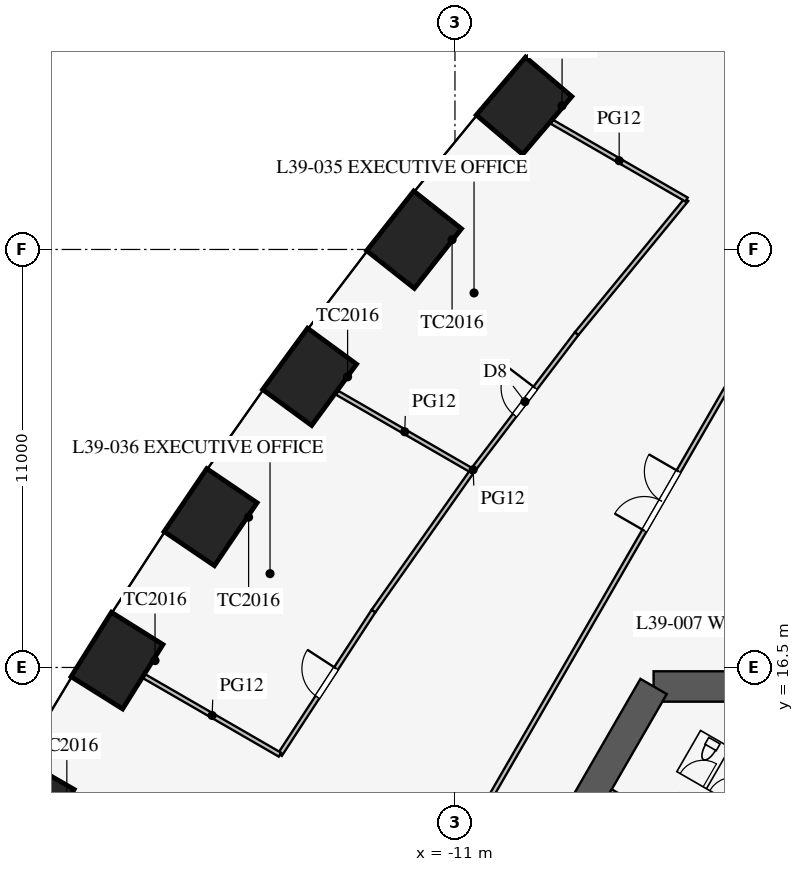
"""IFC4 building model, lengths in metres.
Left out: names, types, materials, properties, quantities, classifications, styles, units other than length and angle.
Written with IfcOpenShell. Run it as: python <this file> out.ifc"""

import sys

from ifc_helpers import new_model, si_unit, direction, frame, frame_2d, origin, origin_2d, place, context, subcontext, project, spatial, rectangle, extrude, element, fill, save


model = new_model("IFC4")
c1 = context("Model", 3, precision=1e-05, world=origin(), true_north=direction((0.0, 1.0)))
c2 = subcontext(c1, "Body", "Model", "MODEL_VIEW")
j1 = project(units=[si_unit("LENGTHUNIT", "METRE"), si_unit("PLANEANGLEUNIT", "RADIAN")], contexts=[c1])
p1 = place(None, origin())
s1 = spatial("IfcSite", under=j1, at=p1, CompositionType="ELEMENT")
p2 = place(p1, origin())
s2 = spatial("IfcBuilding", under=s1, at=p2, CompositionType="ELEMENT")
p3 = place(p2, frame((0.0, 0.0, 170.3)))
s3 = spatial("IfcBuildingStorey", under=s2, at=p3, CompositionType="ELEMENT", Elevation=170.3)
for number, where, z_axis, x_axis in (
    (1, (-9.182, 31.282, 0.0), (0.0, 0.0, 1.0), (-0.648, -0.762, 0.0)),
    (2, (-12.077, 27.757, 0.0), (0.0, 0.0, 1.0), (-0.62, -0.785, 0.0)),
    (3, (-14.825, 24.148, 0.0), (0.0, 0.0, 1.0), (-0.591, -0.807, 0.0)),
    (4, (-17.43, 20.456, 0.0), (0.0, 0.0, 1.0), (-0.561, -0.828, 0.0)),
    (5, (-19.893, 16.681, 0.0), (0.0, 0.0, 1.0), (-0.531, -0.847, 0.0)),
    (6, (-22.213, 12.825, 0.0), (0.0, 0.0, 1.0), (-0.5, -0.866, 0.0)),
):
    element("IfcColumn", number, at=place(p3, frame(where, z_axis=z_axis, x_axis=x_axis)), inside=s3, PredefinedType="COLUMN", context=c2, shape_type="SweptSolid", body=[
        extrude(rectangle(XDim=2.0, YDim=1.6, at=origin_2d()), origin(), (0.0, 0.0, 1.0), 4.2),
    ])
p4 = place(p3, frame((5.773, 16.0, 0.0), z_axis=(0.0, 0.0, 1.0), x_axis=(-1.0, 0.0, 0.0)))
e7 = element("IfcWall", 7, at=p4, inside=s3, PredefinedType="SHEAR", context=c2, shape_type="SweptSolid", body=[
    extrude(rectangle(XDim=11.547, YDim=0.8, at=frame_2d((5.773, 0.0))), origin(), (0.0, 0.0, 1.0), 4.2),
])
p5 = place(p3, frame((-5.773, 16.0, 0.0), z_axis=(0.0, 0.0, 1.0), x_axis=(-0.500002442456, -0.866023993627, 0.0)))
e8 = element("IfcWall", 8, at=p5, inside=s3, PredefinedType="SHEAR", context=c2, shape_type="SweptSolid", body=[
    extrude(rectangle(XDim=21.939, YDim=0.8, at=frame_2d((10.97, 0.0))), origin(), (0.0, 0.0, 1.0), 4.2),
])
p6 = place(p5, frame((17.27, 0.0, 0.0)))
e9 = element("IfcOpeningElement", 9, at=p6, cuts=e8, PredefinedType="OPENING", context=c2, shape_type="SweptSolid", body=[
    extrude(rectangle(XDim=1.2, YDim=2.1, at=frame_2d((0.6, 1.05))), frame((0.0, 0.41, 0.0), z_axis=(0.0, -1.0, 0.0), x_axis=(1.0, 0.0, 0.0)), (0.0, 0.0, 1.0), 0.82),
])
p7 = place(p5, frame((3.47, 0.0, 0.0)))
e10 = element("IfcOpeningElement", 10, at=p7, cuts=e8, PredefinedType="OPENING", context=c2, shape_type="SweptSolid", body=[
    extrude(rectangle(XDim=1.2, YDim=2.1, at=frame_2d((0.6, 1.05))), frame((0.0, 0.41, 0.0), z_axis=(0.0, -1.0, 0.0), x_axis=(1.0, 0.0, 0.0)), (0.0, 0.0, 1.0), 0.82),
])
p8 = place(p3, frame((-2.495, 10.678, 0.0), z_axis=(0.0, 0.0, 1.0), x_axis=(-0.86602216432, 0.500005610874, 0.0)))
e11 = element("IfcWall", 11, at=p8, inside=s3, PredefinedType="PARTITIONING", context=c2, shape_type="SweptSolid", body=[
    extrude(rectangle(XDim=5.1, YDim=0.15, at=frame_2d((2.55, 0.0))), origin(), (0.0, 0.0, 1.0), 4.0),
])
p9 = place(p8, frame((2.6, 0.0, 0.0)))
e12 = element("IfcOpeningElement", 12, at=p9, cuts=e11, PredefinedType="OPENING", context=c2, shape_type="SweptSolid", body=[
    extrude(rectangle(XDim=0.9, YDim=2.1, at=frame_2d((0.45, 1.05))), frame((0.0, 0.085, 0.0), z_axis=(0.0, -1.0, 0.0), x_axis=(1.0, 0.0, 0.0)), (0.0, 0.0, 1.0), 0.17),
])
p10 = place(p3, frame((-0.016, 30.491, 0.0), z_axis=(0.0, 0.0, 1.0), x_axis=(-0.50000091641, -0.866024874695, 0.0)))
e13 = element("IfcWall", 13, at=p10, inside=s3, PredefinedType="PARTITIONING", context=c2, shape_type="SweptSolid", body=[
    extrude(rectangle(XDim=52.796, YDim=0.12, at=frame_2d((26.398, 0.0))), origin(), (0.0, 0.0, 1.0), 2.9),
])
p11 = place(p10, frame((10.2, 0.0, 0.15)))
e14 = element("IfcOpeningElement", 14, at=p11, cuts=e13, PredefinedType="OPENING", context=c2, shape_type="SweptSolid", body=[
    extrude(rectangle(XDim=1.8, YDim=2.1, at=frame_2d((0.9, 1.05))), frame((0.0, 0.07, 0.0), z_axis=(0.0, -1.0, 0.0), x_axis=(1.0, 0.0, 0.0)), (0.0, 0.0, 1.0), 0.14),
])
p12 = place(p10, frame((40.8, 0.0, 0.15)))
e15 = element("IfcOpeningElement", 15, at=p12, cuts=e13, PredefinedType="OPENING", context=c2, shape_type="SweptSolid", body=[
    extrude(rectangle(XDim=1.8, YDim=2.1, at=frame_2d((0.9, 1.05))), frame((0.0, 0.07, 0.0), z_axis=(0.0, -1.0, 0.0), x_axis=(1.0, 0.0, 0.0)), (0.0, 0.0, 1.0), 0.14),
])
p13 = place(p3, frame((-10.543, 21.675, 0.0), z_axis=(0.0, 0.0, 1.0), x_axis=(-0.575987178736, -0.817458726745, 0.0)))
e16 = element("IfcWall", 16, at=p13, inside=s3, PredefinedType="PARTITIONING", context=c2, shape_type="SweptSolid", body=[
    extrude(rectangle(XDim=4.518, YDim=0.12, at=frame_2d((2.259, 0.0))), origin(), (0.0, 0.0, 1.0), 2.9),
])
p14 = place(p3, frame((-7.797, 25.286, 0.0), z_axis=(0.0, 0.0, 1.0), x_axis=(-0.605274299339, -0.796016973789, 0.0)))
e17 = element("IfcWall", 17, at=p14, inside=s3, PredefinedType="PARTITIONING", context=c2, shape_type="SweptSolid", body=[
    extrude(rectangle(XDim=4.536, YDim=0.12, at=frame_2d((2.268, 0.0))), origin(), (0.0, 0.0, 1.0), 2.9),
])
p15 = place(p14, frame((1.8, 0.0, 0.15)))
e18 = element("IfcOpeningElement", 18, at=p15, cuts=e17, PredefinedType="OPENING", context=c2, shape_type="SweptSolid", body=[
    extrude(rectangle(XDim=0.9, YDim=2.1, at=frame_2d((0.45, 1.05))), frame((0.0, 0.07, 0.0), z_axis=(0.0, -1.0, 0.0), x_axis=(1.0, 0.0, 0.0)), (0.0, 0.0, 1.0), 0.14),
])
p16 = place(p3, frame((-4.906, 28.813, 0.0), z_axis=(0.0, 0.0, 1.0), x_axis=(-0.633843962561, -0.773460943503, 0.0)))
e19 = element("IfcWall", 19, at=p16, inside=s3, PredefinedType="PARTITIONING", context=c2, shape_type="SweptSolid", body=[
    extrude(rectangle(XDim=4.561, YDim=0.12, at=frame_2d((2.28, 0.0))), origin(), (0.0, 0.0, 1.0), 2.9),
])
p17 = place(p3, frame((-13.145, 17.982, 0.0), z_axis=(0.0, 0.0, 1.0), x_axis=(-0.546069464151, -0.837739900161, 0.0)))
e20 = element("IfcWall", 20, at=p17, inside=s3, PredefinedType="PARTITIONING", context=c2, shape_type="SweptSolid", body=[
    extrude(rectangle(XDim=4.507, YDim=0.12, at=frame_2d((2.253, 0.0))), origin(), (0.0, 0.0, 1.0), 2.9),
])
p18 = place(p17, frame((1.8, 0.0, 0.15)))
e21 = element("IfcOpeningElement", 21, at=p18, cuts=e20, PredefinedType="OPENING", context=c2, shape_type="SweptSolid", body=[
    extrude(rectangle(XDim=0.9, YDim=2.1, at=frame_2d((0.45, 1.05))), frame((0.0, 0.07, 0.0), z_axis=(0.0, -1.0, 0.0), x_axis=(1.0, 0.0, 0.0)), (0.0, 0.0, 1.0), 0.14),
])
p19 = place(p3, frame((-10.543, 21.675, 0.0), z_axis=(0.0, 0.0, 1.0), x_axis=(-0.866019409031, 0.500010383074, 0.0)))
e22 = element("IfcWall", 22, at=p19, inside=s3, PredefinedType="PARTITIONING", context=c2, shape_type="SweptSolid", body=[
    extrude(rectangle(XDim=4.11, YDim=0.12, at=frame_2d((2.055, 0.0))), origin(), (0.0, 0.0, 1.0), 2.4),
])
p20 = place(p3, frame((-4.906, 28.813, 0.0), z_axis=(0.0, 0.0, 1.0), x_axis=(-0.86601374377, 0.500020195194, 0.0)))
e23 = element("IfcWall", 23, at=p20, inside=s3, PredefinedType="PARTITIONING", context=c2, shape_type="SweptSolid", body=[
    extrude(rectangle(XDim=4.093, YDim=0.12, at=frame_2d((2.046, 0.0))), origin(), (0.0, 0.0, 1.0), 2.8),
])
p21 = place(p3, frame((-15.606, 14.206, 0.0), z_axis=(0.0, 0.0, 1.0), x_axis=(-0.866016800201, 0.500014901547, 0.0)))
e24 = element("IfcWall", 24, at=p21, inside=s3, PredefinedType="PARTITIONING", context=c2, shape_type="SweptSolid", body=[
    extrude(rectangle(XDim=4.119, YDim=0.12, at=frame_2d((2.06, 0.0))), origin(), (0.0, 0.0, 1.0), 2.6),
])
p22 = place(p15, frame((0.9, 0.0, 0.0), z_axis=(0.0, 0.0, 1.0), x_axis=(-1.0, 0.0, 0.0)))
e25 = element("IfcDoor", 25, at=p22, inside=s3, OperationType="SINGLE_SWING_RIGHT", PredefinedType="DOOR", context=c2, shape_type="SweptSolid", body=[
    extrude(rectangle(XDim=0.9, YDim=2.1, at=frame_2d((0.45, 1.05))), frame((0.0, 0.025, 0.0), z_axis=(0.0, -1.0, 0.0), x_axis=(1.0, 0.0, 0.0)), (0.0, 0.0, 1.0), 0.05),
])
fill(e18, e25)
p23 = place(p18, frame((0.9, 0.0, 0.0), z_axis=(0.0, 0.0, 1.0), x_axis=(-1.0, 0.0, 0.0)))
e26 = element("IfcDoor", 26, at=p23, inside=s3, OperationType="SINGLE_SWING_RIGHT", PredefinedType="DOOR", context=c2, shape_type="SweptSolid", body=[
    extrude(rectangle(XDim=0.9, YDim=2.1, at=frame_2d((0.45, 1.05))), frame((0.0, 0.025, 0.0), z_axis=(0.0, -1.0, 0.0), x_axis=(1.0, 0.0, 0.0)), (0.0, 0.0, 1.0), 0.05),
])
fill(e21, e26)
p24 = place(p11, frame((1.8, 0.0, 0.0), z_axis=(0.0, 0.0, 1.0), x_axis=(-1.0, 0.0, 0.0)))
e27 = element("IfcDoor", 27, at=p24, inside=s3, OperationType="DOUBLE_DOOR_SINGLE_SWING", PredefinedType="DOOR", context=c2, shape_type="SweptSolid", body=[
    extrude(rectangle(XDim=1.8, YDim=2.1, at=frame_2d((0.9, 1.05))), frame((0.0, 0.025, 0.0), z_axis=(0.0, -1.0, 0.0), x_axis=(1.0, 0.0, 0.0)), (0.0, 0.0, 1.0), 0.05),
])
fill(e14, e27)
save(model, sys.argv[1])
